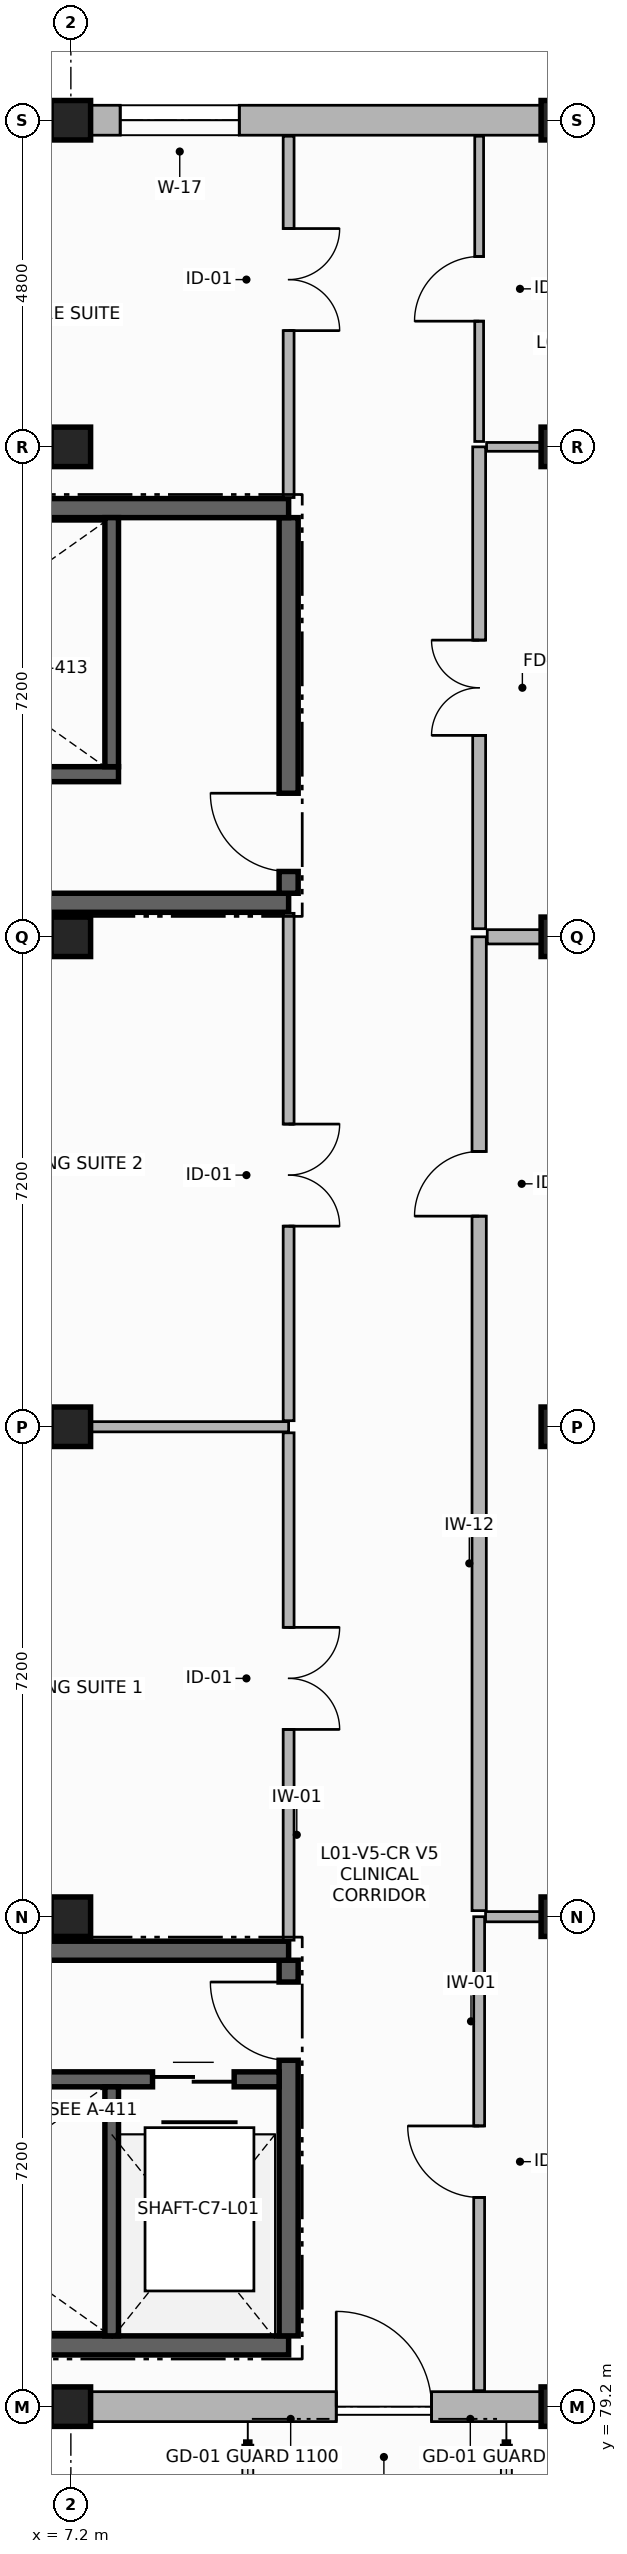
"""IFC4 building model, lengths in metres.
Left out: names, types, materials, properties, quantities, classifications, styles, units other than length and angle.
Written with IfcOpenShell. Run it as: python <this file> out.ifc"""

import sys

from ifc_helpers import new_model, si_unit, direction, frame, frame_2d, origin, origin_2d, place, context, subcontext, project, spatial, rectangle, extrude, element, fill, save


model = new_model("IFC4")
c1 = context("Model", 3, precision=1e-05, world=origin(), true_north=direction((0.0, 1.0)))
c2 = subcontext(c1, "Body", "Model", "MODEL_VIEW")
j1 = project(units=[si_unit("LENGTHUNIT", "METRE"), si_unit("PLANEANGLEUNIT", "RADIAN")], contexts=[c1])
p1 = place(None, origin())
s1 = spatial("IfcSite", under=j1, at=p1, CompositionType="ELEMENT")
p2 = place(p1, origin())
s2 = spatial("IfcBuilding", under=s1, at=p2, CompositionType="ELEMENT")
p3 = place(p2, frame((0.0, 0.0, 4.5)))
s3 = spatial("IfcBuildingStorey", under=s2, at=p3, CompositionType="ELEMENT", Elevation=4.5)
for number, where, z_axis, x_axis in (
    (1, (7.2, 79.2, 0.0), (0.0, 0.0, 1.0), (1.0, 0.0, 0.0)),
    (2, (7.2, 86.4, 0.0), (0.0, 0.0, 1.0), (1.0, 0.0, 0.0)),
    (3, (7.2, 93.6, 0.0), (0.0, 0.0, 1.0), (1.0, 0.0, 0.0)),
    (4, (7.2, 100.8, 0.0), (0.0, 0.0, 1.0), (1.0, 0.0, 0.0)),
    (5, (7.2, 108.0, 0.0), (0.0, 0.0, 1.0), (1.0, 0.0, 0.0)),
    (6, (7.2, 112.8, 0.0), (0.0, 0.0, 1.0), (1.0, 0.0, 0.0)),
    (7, (14.4, 79.2, 0.0), (0.0, 0.0, 1.0), (1.0, 0.0, 0.0)),
    (8, (14.4, 86.4, 0.0), (0.0, 0.0, 1.0), (1.0, 0.0, 0.0)),
    (9, (14.4, 93.6, 0.0), (0.0, 0.0, 1.0), (1.0, 0.0, 0.0)),
    (10, (14.4, 100.8, 0.0), (0.0, 0.0, 1.0), (1.0, 0.0, 0.0)),
    (11, (14.4, 108.0, 0.0), (0.0, 0.0, 1.0), (1.0, 0.0, 0.0)),
    (12, (14.4, 112.8, 0.0), (0.0, 0.0, 1.0), (1.0, 0.0, 0.0)),
):
    element("IfcColumn", number, at=place(p3, frame(where, z_axis=z_axis, x_axis=x_axis)), inside=s3, PredefinedType="COLUMN", context=c2, shape_type="SweptSolid", body=[
        extrude(rectangle(XDim=0.58, YDim=0.58, at=origin_2d()), origin(), (0.0, 0.0, 1.0), 3.59),
    ])
p4 = place(p3, frame((0.0, 79.2, 0.0), z_axis=(0.0, 0.0, 1.0), x_axis=(1.0, 0.0, 0.0)))
e13 = element("IfcWall", 13, at=p4, inside=s3, PredefinedType="SOLIDWALL", context=c2, shape_type="SweptSolid", body=[
    extrude(rectangle(XDim=7.2, YDim=0.44, at=frame_2d((3.6, 0.0))), origin(), (0.0, 0.0, 1.0), 2.92),
])
p5 = place(p4, frame((2.725, 0.0, 0.9)))
e14 = element("IfcOpeningElement", 14, at=p5, cuts=e13, PredefinedType="OPENING", context=c2, shape_type="SweptSolid", body=[
    extrude(rectangle(XDim=1.75, YDim=1.8, at=frame_2d((0.875, 0.9))), frame((0.0, 0.23, 0.0), z_axis=(0.0, -1.0, 0.0), x_axis=(1.0, 0.0, 0.0)), (0.0, 0.0, 1.0), 0.46),
])
p6 = place(p3, frame((7.2, 79.2, 0.0), z_axis=(0.0, 0.0, 1.0), x_axis=(1.0, 0.0, 0.0)))
e15 = element("IfcWall", 15, at=p6, inside=s3, PredefinedType="SOLIDWALL", context=c2, shape_type="SweptSolid", body=[
    extrude(rectangle(XDim=7.2, YDim=0.44, at=frame_2d((3.6, 0.0))), origin(), (0.0, 0.0, 1.0), 2.92),
])
p7 = place(p6, frame((3.9, 0.0, 0.0)))
e16 = element("IfcOpeningElement", 16, at=p7, cuts=e15, PredefinedType="OPENING", context=c2, shape_type="SweptSolid", body=[
    extrude(rectangle(XDim=1.4, YDim=2.25, at=frame_2d((0.7, 1.125))), frame((0.0, 0.23, 0.0), z_axis=(0.0, -1.0, 0.0), x_axis=(1.0, 0.0, 0.0)), (0.0, 0.0, 1.0), 0.46),
])
p8 = place(p3, frame((14.4, 112.8, 0.0), z_axis=(0.0, 0.0, 1.0), x_axis=(-1.0, 0.0, 0.0)))
e17 = element("IfcWall", 17, at=p8, inside=s3, PredefinedType="SOLIDWALL", context=c2, shape_type="SweptSolid", body=[
    extrude(rectangle(XDim=7.2, YDim=0.44, at=frame_2d((3.6, 0.0))), origin(), (0.0, 0.0, 1.0), 2.92),
])
p9 = place(p8, frame((4.725, 0.0, 0.9)))
e18 = element("IfcOpeningElement", 18, at=p9, cuts=e17, PredefinedType="OPENING", context=c2, shape_type="SweptSolid", body=[
    extrude(rectangle(XDim=1.75, YDim=1.8, at=frame_2d((0.875, 0.9))), frame((0.0, 0.23, 0.0), z_axis=(0.0, -1.0, 0.0), x_axis=(1.0, 0.0, 0.0)), (0.0, 0.0, 1.0), 0.46),
])
p10 = place(p3, frame((7.2, 112.8, 0.0), z_axis=(0.0, 0.0, 1.0), x_axis=(-1.0, 0.0, 0.0)))
e19 = element("IfcWall", 19, at=p10, inside=s3, PredefinedType="SOLIDWALL", context=c2, shape_type="SweptSolid", body=[
    extrude(rectangle(XDim=7.2, YDim=0.44, at=frame_2d((3.6, 0.0))), origin(), (0.0, 0.0, 1.0), 2.92),
])
p11 = place(p10, frame((2.725, 0.0, 0.9)))
e20 = element("IfcOpeningElement", 20, at=p11, cuts=e19, PredefinedType="OPENING", context=c2, shape_type="SweptSolid", body=[
    extrude(rectangle(XDim=1.75, YDim=1.8, at=frame_2d((0.875, 0.9))), frame((0.0, 0.23, 0.0), z_axis=(0.0, -1.0, 0.0), x_axis=(1.0, 0.0, 0.0)), (0.0, 0.0, 1.0), 0.46),
])
p12 = place(p3, frame((0.9, 80.1, 0.0), z_axis=(0.0, 0.0, 1.0), x_axis=(1.0, 0.0, 0.0)))
e21 = element("IfcWall", 21, at=p12, inside=s3, PredefinedType="SHEAR", context=c2, shape_type="SweptSolid", body=[
    extrude(rectangle(XDim=9.5, YDim=0.28, at=frame_2d((4.75, 0.0))), origin(), (0.0, 0.0, 1.0), 3.59),
])
p13 = place(p3, frame((10.4, 80.24, 0.0), z_axis=(0.0, 0.0, 1.0), x_axis=(0.0, 1.0, 0.0)))
e22 = element("IfcWall", 22, at=p13, inside=s3, PredefinedType="SHEAR", context=c2, shape_type="SweptSolid", body=[
    extrude(rectangle(XDim=5.52, YDim=0.28, at=frame_2d((2.76, 0.0))), origin(), (0.0, 0.0, 1.0), 3.59),
])
p14 = place(p13, frame((4.05, 0.0, 0.0)))
e23 = element("IfcOpeningElement", 23, at=p14, cuts=e22, PredefinedType="OPENING", context=c2, shape_type="SweptSolid", body=[
    extrude(rectangle(XDim=1.15, YDim=2.2, at=frame_2d((0.575, 1.1))), frame((0.0, 0.15, 0.0), z_axis=(0.0, -1.0, 0.0), x_axis=(1.0, 0.0, 0.0)), (0.0, 0.0, 1.0), 0.3),
])
p15 = place(p3, frame((10.4, 85.9, 0.0), z_axis=(0.0, 0.0, 1.0), x_axis=(-1.0, 0.0, 0.0)))
e24 = element("IfcWall", 24, at=p15, inside=s3, PredefinedType="SHEAR", context=c2, shape_type="SweptSolid", body=[
    extrude(rectangle(XDim=9.5, YDim=0.28, at=frame_2d((4.75, 0.0))), origin(), (0.0, 0.0, 1.0), 3.59),
])
p16 = place(p3, frame((1.04, 84.01, 0.0), z_axis=(0.0, 0.0, 1.0), x_axis=(1.0, 0.0, 0.0)))
e25 = element("IfcWall", 25, at=p16, inside=s3, PredefinedType="SHEAR", context=c2, shape_type="SweptSolid", body=[
    extrude(rectangle(XDim=9.22, YDim=0.22, at=frame_2d((4.61, 0.0))), origin(), (0.0, 0.0, 1.0), 3.59),
])
p17 = place(p16, frame((0.31, 0.0, 0.0)))
e26 = element("IfcOpeningElement", 26, at=p17, cuts=e25, PredefinedType="OPENING", context=c2, shape_type="SweptSolid", body=[
    extrude(rectangle(XDim=1.1, YDim=2.15, at=frame_2d((0.55, 1.075))), frame((0.0, 0.12, 0.0), z_axis=(0.0, -1.0, 0.0), x_axis=(1.0, 0.0, 0.0)), (0.0, 0.0, 1.0), 0.24),
])
p18 = place(p16, frame((7.36, 0.0, 0.0)))
e27 = element("IfcOpeningElement", 27, at=p18, cuts=e25, PredefinedType="OPENING", context=c2, shape_type="SweptSolid", body=[
    extrude(rectangle(XDim=1.2, YDim=2.2, at=frame_2d((0.6, 1.1))), frame((0.0, 0.12, 0.0), z_axis=(0.0, -1.0, 0.0), x_axis=(1.0, 0.0, 0.0)), (0.0, 0.0, 1.0), 0.24),
])
p19 = place(p3, frame((7.8, 80.24, 0.0), z_axis=(0.0, 0.0, 1.0), x_axis=(0.0, 1.0, 0.0)))
e28 = element("IfcWall", 28, at=p19, inside=s3, PredefinedType="SHEAR", context=c2, shape_type="SweptSolid", body=[
    extrude(rectangle(XDim=3.66, YDim=0.2, at=frame_2d((1.83, 0.0))), origin(), (0.0, 0.0, 1.0), 3.59),
])
p20 = place(p3, frame((0.9, 101.3, 0.0), z_axis=(0.0, 0.0, 1.0), x_axis=(1.0, 0.0, 0.0)))
e29 = element("IfcWall", 29, at=p20, inside=s3, PredefinedType="SHEAR", context=c2, shape_type="SweptSolid", body=[
    extrude(rectangle(XDim=9.5, YDim=0.28, at=frame_2d((4.75, 0.0))), origin(), (0.0, 0.0, 1.0), 3.59),
])
p21 = place(p3, frame((10.4, 101.44, 0.0), z_axis=(0.0, 0.0, 1.0), x_axis=(0.0, 1.0, 0.0)))
e30 = element("IfcWall", 30, at=p21, inside=s3, PredefinedType="SHEAR", context=c2, shape_type="SweptSolid", body=[
    extrude(rectangle(XDim=5.52, YDim=0.28, at=frame_2d((2.76, 0.0))), origin(), (0.0, 0.0, 1.0), 3.59),
])
p22 = place(p21, frame((0.32, 0.0, 0.0)))
e31 = element("IfcOpeningElement", 31, at=p22, cuts=e30, PredefinedType="OPENING", context=c2, shape_type="SweptSolid", body=[
    extrude(rectangle(XDim=1.15, YDim=2.2, at=frame_2d((0.575, 1.1))), frame((0.0, 0.15, 0.0), z_axis=(0.0, -1.0, 0.0), x_axis=(1.0, 0.0, 0.0)), (0.0, 0.0, 1.0), 0.3),
])
p23 = place(p3, frame((10.4, 107.1, 0.0), z_axis=(0.0, 0.0, 1.0), x_axis=(-1.0, 0.0, 0.0)))
e32 = element("IfcWall", 32, at=p23, inside=s3, PredefinedType="SHEAR", context=c2, shape_type="SweptSolid", body=[
    extrude(rectangle(XDim=9.5, YDim=0.28, at=frame_2d((4.75, 0.0))), origin(), (0.0, 0.0, 1.0), 3.59),
])
p24 = place(p3, frame((1.04, 103.19, 0.0), z_axis=(0.0, 0.0, 1.0), x_axis=(1.0, 0.0, 0.0)))
e33 = element("IfcWall", 33, at=p24, inside=s3, PredefinedType="SHEAR", context=c2, shape_type="SweptSolid", body=[
    extrude(rectangle(XDim=6.86, YDim=0.22, at=frame_2d((3.43, 0.0))), origin(), (0.0, 0.0, 1.0), 3.59),
])
p25 = place(p24, frame((0.31, 0.0, 0.0)))
e34 = element("IfcOpeningElement", 34, at=p25, cuts=e33, PredefinedType="OPENING", context=c2, shape_type="SweptSolid", body=[
    extrude(rectangle(XDim=1.1, YDim=2.15, at=frame_2d((0.55, 1.075))), frame((0.0, 0.12, 0.0), z_axis=(0.0, -1.0, 0.0), x_axis=(1.0, 0.0, 0.0)), (0.0, 0.0, 1.0), 0.24),
])
p26 = place(p3, frame((7.8, 103.3, 0.0), z_axis=(0.0, 0.0, 1.0), x_axis=(0.0, 1.0, 0.0)))
e35 = element("IfcWall", 35, at=p26, inside=s3, PredefinedType="SHEAR", context=c2, shape_type="SweptSolid", body=[
    extrude(rectangle(XDim=3.66, YDim=0.2, at=frame_2d((1.83, 0.0))), origin(), (0.0, 0.0, 1.0), 3.59),
])
p27 = place(p3, frame((0.235, 93.6, 0.0), z_axis=(0.0, 0.0, 1.0), x_axis=(1.0, 0.0, 0.0)))
e36 = element("IfcWall", 36, at=p27, inside=s3, PredefinedType="PARTITIONING", context=c2, shape_type="SweptSolid", body=[
    extrude(rectangle(XDim=10.165, YDim=0.15, at=frame_2d((5.083, 0.0))), origin(), (0.0, 0.0, 1.0), 2.9),
])
p28 = place(p3, frame((10.4, 93.511, 0.0), z_axis=(0.0, 0.0, 1.0), x_axis=(0.0, -1.0, 0.0)))
e37 = element("IfcWall", 37, at=p28, inside=s3, PredefinedType="PARTITIONING", context=c2, shape_type="SweptSolid", body=[
    extrude(rectangle(XDim=7.456, YDim=0.16, at=frame_2d((3.728, 0.0))), origin(), (0.0, 0.0, 1.0), 2.9),
])
p29 = place(p28, frame((2.859, 0.0, 0.0)))
e38 = element("IfcOpeningElement", 38, at=p29, cuts=e37, PredefinedType="OPENING", context=c2, shape_type="SweptSolid", body=[
    extrude(rectangle(XDim=1.5, YDim=2.3, at=frame_2d((0.75, 1.15))), frame((0.0, 0.09, 0.0), z_axis=(0.0, -1.0, 0.0), x_axis=(1.0, 0.0, 0.0)), (0.0, 0.0, 1.0), 0.18),
])
p30 = place(p3, frame((10.4, 101.145, 0.0), z_axis=(0.0, 0.0, 1.0), x_axis=(0.0, -1.0, 0.0)))
e39 = element("IfcWall", 39, at=p30, inside=s3, PredefinedType="PARTITIONING", context=c2, shape_type="SweptSolid", body=[
    extrude(rectangle(XDim=7.456, YDim=0.16, at=frame_2d((3.728, 0.0))), origin(), (0.0, 0.0, 1.0), 2.9),
])
p31 = place(p30, frame((3.097, 0.0, 0.0)))
e40 = element("IfcOpeningElement", 40, at=p31, cuts=e39, PredefinedType="OPENING", context=c2, shape_type="SweptSolid", body=[
    extrude(rectangle(XDim=1.5, YDim=2.3, at=frame_2d((0.75, 1.15))), frame((0.0, 0.09, 0.0), z_axis=(0.0, -1.0, 0.0), x_axis=(1.0, 0.0, 0.0)), (0.0, 0.0, 1.0), 0.18),
])
p32 = place(p3, frame((10.4, 112.565, 0.0), z_axis=(0.0, 0.0, 1.0), x_axis=(0.0, -1.0, 0.0)))
e41 = element("IfcWall", 41, at=p32, inside=s3, PredefinedType="PARTITIONING", context=c2, shape_type="SweptSolid", body=[
    extrude(rectangle(XDim=5.31, YDim=0.16, at=frame_2d((2.655, 0.0))), origin(), (0.0, 0.0, 1.0), 2.9),
])
p33 = place(p32, frame((1.357, 0.0, 0.0)))
e42 = element("IfcOpeningElement", 42, at=p33, cuts=e41, PredefinedType="OPENING", context=c2, shape_type="SweptSolid", body=[
    extrude(rectangle(XDim=1.5, YDim=2.3, at=frame_2d((0.75, 1.15))), frame((0.0, 0.09, 0.0), z_axis=(0.0, -1.0, 0.0), x_axis=(1.0, 0.0, 0.0)), (0.0, 0.0, 1.0), 0.18),
])
p34 = place(p3, frame((13.2, 79.435, 0.0), z_axis=(0.0, 0.0, 1.0), x_axis=(0.0, 1.0, 0.0)))
e43 = element("IfcWall", 43, at=p34, inside=s3, PredefinedType="PARTITIONING", context=c2, shape_type="SweptSolid", body=[
    extrude(rectangle(XDim=6.965, YDim=0.16, at=frame_2d((3.482, 0.0))), origin(), (0.0, 0.0, 1.0), 2.9),
])
p35 = place(p34, frame((2.84, 0.0, 0.0)))
e44 = element("IfcOpeningElement", 44, at=p35, cuts=e43, PredefinedType="OPENING", context=c2, shape_type="SweptSolid", body=[
    extrude(rectangle(XDim=1.05, YDim=2.15, at=frame_2d((0.525, 1.075))), frame((0.0, 0.09, 0.0), z_axis=(0.0, -1.0, 0.0), x_axis=(1.0, 0.0, 0.0)), (0.0, 0.0, 1.0), 0.18),
])
p36 = place(p3, frame((13.294, 86.4, 0.0), z_axis=(0.0, 0.0, 1.0), x_axis=(1.0, 0.0, 0.0)))
e45 = element("IfcWall", 45, at=p36, inside=s3, PredefinedType="PARTITIONING", context=c2, shape_type="SweptSolid", body=[
    extrude(rectangle(XDim=15.271, YDim=0.15, at=frame_2d((7.635, 0.0))), origin(), (0.0, 0.0, 1.0), 2.9),
])
p37 = place(p3, frame((13.2, 86.489, 0.0), z_axis=(0.0, 0.0, 1.0), x_axis=(0.0, 1.0, 0.0)))
e46 = element("IfcWall", 46, at=p37, inside=s3, PredefinedType="PARTITIONING", context=c2, shape_type="SweptSolid", body=[
    extrude(rectangle(XDim=14.311, YDim=0.21, at=frame_2d((7.156, 0.0))), origin(), (0.0, 0.0, 1.0), 2.9),
])
p38 = place(p37, frame((10.206, 0.0, 0.0)))
e47 = element("IfcOpeningElement", 47, at=p38, cuts=e46, PredefinedType="OPENING", context=c2, shape_type="SweptSolid", body=[
    extrude(rectangle(XDim=0.95, YDim=2.15, at=frame_2d((0.475, 1.075))), frame((0.0, 0.115, 0.0), z_axis=(0.0, -1.0, 0.0), x_axis=(1.0, 0.0, 0.0)), (0.0, 0.0, 1.0), 0.23),
])
p39 = place(p3, frame((13.319, 100.8, 0.0), z_axis=(0.0, 0.0, 1.0), x_axis=(1.0, 0.0, 0.0)))
e48 = element("IfcWall", 48, at=p39, inside=s3, PredefinedType="PARTITIONING", context=c2, shape_type="SweptSolid", body=[
    extrude(rectangle(XDim=15.246, YDim=0.21, at=frame_2d((7.623, 0.0))), origin(), (0.0, 0.0, 1.0), 2.9),
])
p40 = place(p3, frame((13.2, 100.919, 0.0), z_axis=(0.0, 0.0, 1.0), x_axis=(0.0, 1.0, 0.0)))
e49 = element("IfcWall", 49, at=p40, inside=s3, PredefinedType="PARTITIONING", context=c2, shape_type="SweptSolid", body=[
    extrude(rectangle(XDim=7.081, YDim=0.19, at=frame_2d((3.541, 0.0))), origin(), (0.0, 0.0, 1.0), 2.9),
])
p41 = place(p40, frame((2.841, 0.0, 0.0)))
e50 = element("IfcOpeningElement", 50, at=p41, cuts=e49, PredefinedType="OPENING", context=c2, shape_type="SweptSolid", body=[
    extrude(rectangle(XDim=1.4, YDim=2.25, at=frame_2d((0.7, 1.125))), frame((0.0, 0.105, 0.0), z_axis=(0.0, -1.0, 0.0), x_axis=(1.0, 0.0, 0.0)), (0.0, 0.0, 1.0), 0.21),
])
p42 = place(p3, frame((13.309, 108.0, 0.0), z_axis=(0.0, 0.0, 1.0), x_axis=(1.0, 0.0, 0.0)))
e51 = element("IfcWall", 51, at=p42, inside=s3, PredefinedType="PARTITIONING", context=c2, shape_type="SweptSolid", body=[
    extrude(rectangle(XDim=3.491, YDim=0.13, at=frame_2d((1.746, 0.0))), origin(), (0.0, 0.0, 1.0), 2.9),
])
p43 = place(p3, frame((13.2, 108.079, 0.0), z_axis=(0.0, 0.0, 1.0), x_axis=(0.0, 1.0, 0.0)))
e52 = element("IfcWall", 52, at=p43, inside=s3, PredefinedType="PARTITIONING", context=c2, shape_type="SweptSolid", body=[
    extrude(rectangle(XDim=4.486, YDim=0.13, at=frame_2d((2.243, 0.0))), origin(), (0.0, 0.0, 1.0), 2.9),
])
p44 = place(p43, frame((1.768, 0.0, 0.0)))
e53 = element("IfcOpeningElement", 53, at=p44, cuts=e52, PredefinedType="OPENING", context=c2, shape_type="SweptSolid", body=[
    extrude(rectangle(XDim=0.95, YDim=2.1, at=frame_2d((0.475, 1.05))), frame((0.0, 0.075, 0.0), z_axis=(0.0, -1.0, 0.0), x_axis=(1.0, 0.0, 0.0)), (0.0, 0.0, 1.0), 0.15),
])
p45 = place(p7, origin())
e54 = element("IfcDoor", 54, at=p45, inside=s3, OperationType="SINGLE_SWING_LEFT", PredefinedType="DOOR", context=c2, shape_type="SweptSolid", body=[
    extrude(rectangle(XDim=1.4, YDim=2.25, at=frame_2d((0.7, 1.125))), frame((0.0, 0.025, 0.0), z_axis=(0.0, -1.0, 0.0), x_axis=(1.0, 0.0, 0.0)), (0.0, 0.0, 1.0), 0.05),
])
fill(e16, e54)
p46 = place(p9, origin())
e55 = element("IfcWindow", 55, at=p46, inside=s3, PartitioningType="SINGLE_PANEL", PredefinedType="WINDOW", context=c2, shape_type="SweptSolid", body=[
    extrude(rectangle(XDim=1.75, YDim=1.8, at=frame_2d((0.875, 0.9))), frame((0.0, 0.03, 0.0), z_axis=(0.0, -1.0, 0.0), x_axis=(1.0, 0.0, 0.0)), (0.0, 0.0, 1.0), 0.06),
])
fill(e18, e55)
p47 = place(p18, origin())
e56 = element("IfcDoor", 56, at=p47, inside=s3, OperationType="DOUBLE_DOOR_SLIDING", PredefinedType="DOOR", context=c2, shape_type="SweptSolid", body=[
    extrude(rectangle(XDim=1.2, YDim=2.2, at=frame_2d((0.6, 1.1))), frame((0.0, 0.025, 0.0), z_axis=(0.0, -1.0, 0.0), x_axis=(1.0, 0.0, 0.0)), (0.0, 0.0, 1.0), 0.05),
])
fill(e27, e56)
p48 = place(p14, origin())
e57 = element("IfcDoor", 57, at=p48, inside=s3, OperationType="SINGLE_SWING_RIGHT", PredefinedType="DOOR", context=c2, shape_type="SweptSolid", body=[
    extrude(rectangle(XDim=1.15, YDim=2.2, at=frame_2d((0.575, 1.1))), frame((0.0, 0.025, 0.0), z_axis=(0.0, -1.0, 0.0), x_axis=(1.0, 0.0, 0.0)), (0.0, 0.0, 1.0), 0.05),
])
fill(e23, e57)
p49 = place(p22, origin())
e58 = element("IfcDoor", 58, at=p49, inside=s3, OperationType="SINGLE_SWING_RIGHT", PredefinedType="DOOR", context=c2, shape_type="SweptSolid", body=[
    extrude(rectangle(XDim=1.15, YDim=2.2, at=frame_2d((0.575, 1.1))), frame((0.0, 0.025, 0.0), z_axis=(0.0, -1.0, 0.0), x_axis=(1.0, 0.0, 0.0)), (0.0, 0.0, 1.0), 0.05),
])
fill(e31, e58)
p50 = place(p29, origin())
e59 = element("IfcDoor", 59, at=p50, inside=s3, OperationType="DOUBLE_DOOR_SINGLE_SWING", PredefinedType="DOOR", context=c2, shape_type="SweptSolid", body=[
    extrude(rectangle(XDim=1.5, YDim=2.3, at=frame_2d((0.75, 1.15))), frame((0.0, 0.025, 0.0), z_axis=(0.0, -1.0, 0.0), x_axis=(1.0, 0.0, 0.0)), (0.0, 0.0, 1.0), 0.05),
])
fill(e38, e59)
p51 = place(p31, origin())
e60 = element("IfcDoor", 60, at=p51, inside=s3, OperationType="DOUBLE_DOOR_SINGLE_SWING", PredefinedType="DOOR", context=c2, shape_type="SweptSolid", body=[
    extrude(rectangle(XDim=1.5, YDim=2.3, at=frame_2d((0.75, 1.15))), frame((0.0, 0.025, 0.0), z_axis=(0.0, -1.0, 0.0), x_axis=(1.0, 0.0, 0.0)), (0.0, 0.0, 1.0), 0.05),
])
fill(e40, e60)
p52 = place(p33, origin())
e61 = element("IfcDoor", 61, at=p52, inside=s3, OperationType="DOUBLE_DOOR_SINGLE_SWING", PredefinedType="DOOR", context=c2, shape_type="SweptSolid", body=[
    extrude(rectangle(XDim=1.5, YDim=2.3, at=frame_2d((0.75, 1.15))), frame((0.0, 0.025, 0.0), z_axis=(0.0, -1.0, 0.0), x_axis=(1.0, 0.0, 0.0)), (0.0, 0.0, 1.0), 0.05),
])
fill(e42, e61)
p53 = place(p35, origin())
e62 = element("IfcDoor", 62, at=p53, inside=s3, OperationType="SINGLE_SWING_RIGHT", PredefinedType="DOOR", context=c2, shape_type="SweptSolid", body=[
    extrude(rectangle(XDim=1.05, YDim=2.15, at=frame_2d((0.525, 1.075))), frame((0.0, 0.025, 0.0), z_axis=(0.0, -1.0, 0.0), x_axis=(1.0, 0.0, 0.0)), (0.0, 0.0, 1.0), 0.05),
])
fill(e44, e62)
p54 = place(p38, origin())
e63 = element("IfcDoor", 63, at=p54, inside=s3, OperationType="SINGLE_SWING_LEFT", PredefinedType="DOOR", context=c2, shape_type="SweptSolid", body=[
    extrude(rectangle(XDim=0.95, YDim=2.15, at=frame_2d((0.475, 1.075))), frame((0.0, 0.025, 0.0), z_axis=(0.0, -1.0, 0.0), x_axis=(1.0, 0.0, 0.0)), (0.0, 0.0, 1.0), 0.05),
])
fill(e47, e63)
p55 = place(p41, origin())
e64 = element("IfcDoor", 64, at=p55, inside=s3, OperationType="DOUBLE_DOOR_SINGLE_SWING", PredefinedType="DOOR", context=c2, shape_type="SweptSolid", body=[
    extrude(rectangle(XDim=1.4, YDim=2.25, at=frame_2d((0.7, 1.125))), frame((0.0, 0.025, 0.0), z_axis=(0.0, -1.0, 0.0), x_axis=(1.0, 0.0, 0.0)), (0.0, 0.0, 1.0), 0.05),
])
fill(e50, e64)
p56 = place(p44, origin())
e65 = element("IfcDoor", 65, at=p56, inside=s3, OperationType="SINGLE_SWING_LEFT", PredefinedType="DOOR", context=c2, shape_type="SweptSolid", body=[
    extrude(rectangle(XDim=0.95, YDim=2.1, at=frame_2d((0.475, 1.05))), frame((0.0, 0.025, 0.0), z_axis=(0.0, -1.0, 0.0), x_axis=(1.0, 0.0, 0.0)), (0.0, 0.0, 1.0), 0.05),
])
fill(e53, e65)
save(model, sys.argv[1])
